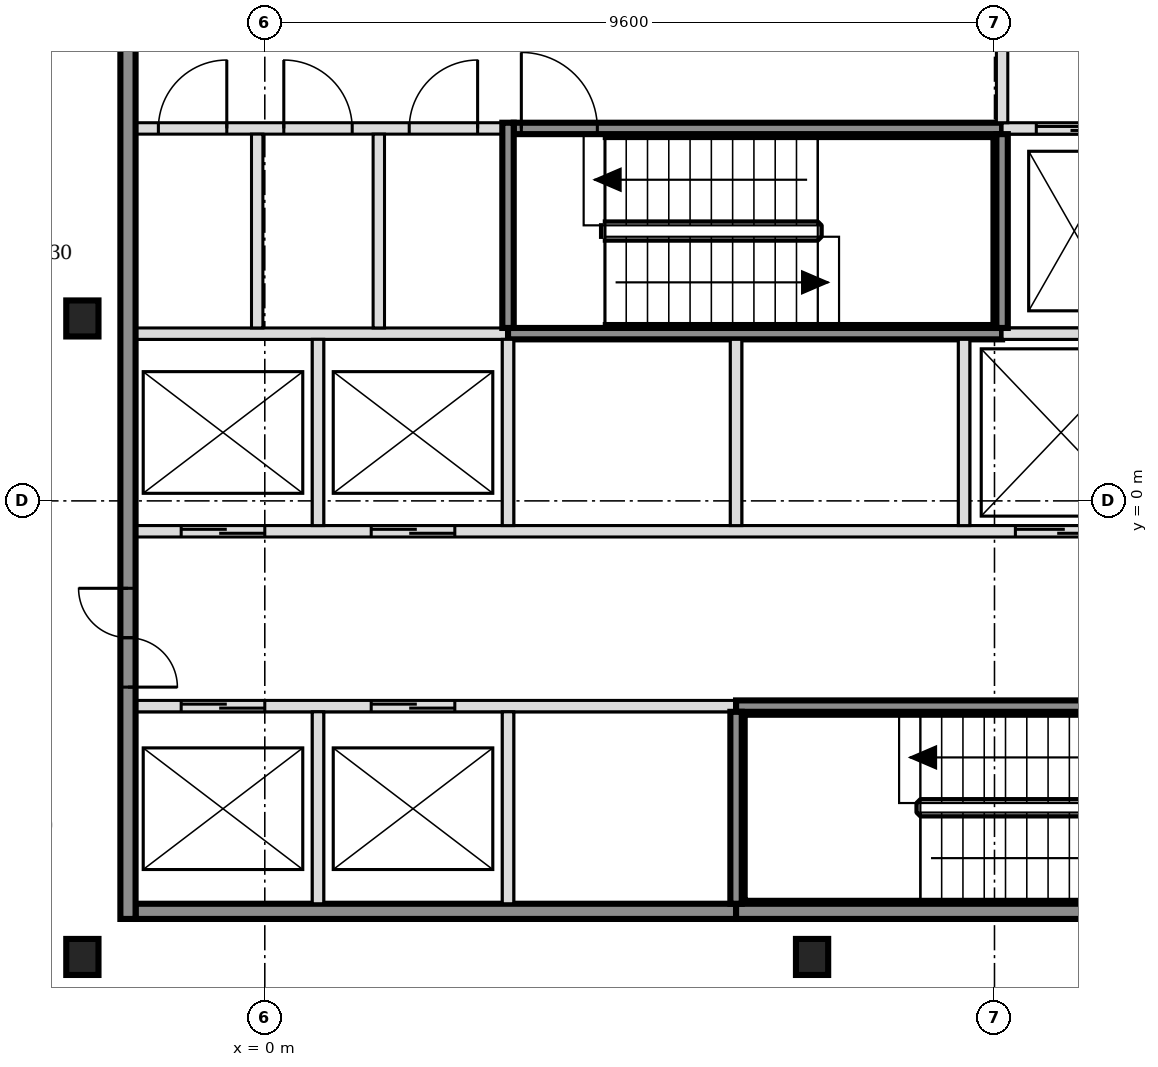
"""IFC4 building model, lengths in metres.
Left out: names, types, materials, properties, quantities, classifications, styles, units other than length and angle.
Written with IfcOpenShell. Run it as: python <this file> out.ifc"""

import sys

from ifc_helpers import new_model, si_unit, direction, frame, frame_2d, origin, origin_2d, place, context, subcontext, project, spatial, rectangle, i_section, extrude, element, fill, save


model = new_model("IFC4")
c1 = context("Model", 3, precision=1e-05, world=origin(), true_north=direction((0.0, 1.0)))
c2 = subcontext(c1, "Body", "Model", "MODEL_VIEW")
j1 = project(units=[si_unit("LENGTHUNIT", "METRE"), si_unit("PLANEANGLEUNIT", "RADIAN")], contexts=[c1])
p1 = place(None, origin())
s1 = spatial("IfcSite", under=j1, at=p1, CompositionType="ELEMENT")
p2 = place(p1, origin())
s2 = spatial("IfcBuilding", under=s1, at=p2, CompositionType="ELEMENT")
p3 = place(p2, frame((0.0, 0.0, 105.0)))
s3 = spatial("IfcBuildingStorey", under=s2, at=p3, CompositionType="ELEMENT", Elevation=105.0)
for number, where, z_axis, x_axis in (
    (1, (-2.4, -6.0, -0.15), (0.0, 0.0, 1.0), (1.0, 0.0, 0.0)),
    (2, (7.2, -6.0, -0.15), (0.0, 0.0, 1.0), (1.0, 0.0, 0.0)),
    (3, (-2.4, 2.4, -0.15), (0.0, 0.0, 1.0), (1.0, 0.0, 0.0)),
):
    element("IfcColumn", number, at=place(p3, frame(where, z_axis=z_axis, x_axis=x_axis)), inside=s3, PredefinedType="COLUMN", context=c2, shape_type="SweptSolid", body=[
        extrude(i_section(OverallWidth=0.424, OverallDepth=0.474, WebThickness=0.048, FlangeThickness=0.077, FilletRadius=0.015, at=origin_2d()), origin(), (0.0, 0.0, 1.0), 3.6),
    ])
p4 = place(p3, frame((-1.7, -5.4, 0.0), z_axis=(0.0, 0.0, 1.0), x_axis=(1.0, 0.0, 0.0)))
e4 = element("IfcWall", 4, at=p4, inside=s3, PredefinedType="SOLIDWALL", context=c2, shape_type="SweptSolid", body=[
    extrude(rectangle(XDim=7.9, YDim=0.2, at=frame_2d((3.95, 0.0))), origin(), (0.0, 0.0, 1.0), 3.45),
])
p5 = place(p3, frame((6.2, -5.4, 0.0), z_axis=(0.0, 0.0, 1.0), x_axis=(1.0, 0.0, 0.0)))
e5 = element("IfcWall", 5, at=p5, inside=s3, PredefinedType="SOLIDWALL", context=c2, shape_type="SweptSolid", body=[
    extrude(rectangle(XDim=6.5, YDim=0.2, at=frame_2d((3.25, 0.0))), origin(), (0.0, 0.0, 1.0), 3.45),
])
p6 = place(p3, frame((-1.7, -2.7, 0.0), z_axis=(0.0, 0.0, 1.0), x_axis=(1.0, 0.0, 0.0)))
e6 = element("IfcWall", 6, at=p6, inside=s3, PredefinedType="SOLIDWALL", context=c2, shape_type="SweptSolid", body=[
    extrude(rectangle(XDim=7.9, YDim=0.15, at=frame_2d((3.95, 0.0))), origin(), (0.0, 0.0, 1.0), 3.45),
])
p7 = place(p6, frame((0.6, 0.0, 0.0)))
e7 = element("IfcOpeningElement", 7, at=p7, cuts=e6, PredefinedType="OPENING", context=c2, shape_type="SweptSolid", body=[
    extrude(rectangle(XDim=1.1, YDim=2.1, at=frame_2d((0.55, 1.05))), frame((0.0, 0.085, 0.0), z_axis=(0.0, -1.0, 0.0), x_axis=(1.0, 0.0, 0.0)), (0.0, 0.0, 1.0), 0.17),
])
p8 = place(p6, frame((3.1, 0.0, 0.0)))
e8 = element("IfcOpeningElement", 8, at=p8, cuts=e6, PredefinedType="OPENING", context=c2, shape_type="SweptSolid", body=[
    extrude(rectangle(XDim=1.1, YDim=2.1, at=frame_2d((0.55, 1.05))), frame((0.0, 0.085, 0.0), z_axis=(0.0, -1.0, 0.0), x_axis=(1.0, 0.0, 0.0)), (0.0, 0.0, 1.0), 0.17),
])
p9 = place(p3, frame((6.2, -2.7, 0.0), z_axis=(0.0, 0.0, 1.0), x_axis=(1.0, 0.0, 0.0)))
e9 = element("IfcWall", 9, at=p9, inside=s3, PredefinedType="SOLIDWALL", context=c2, shape_type="SweptSolid", body=[
    extrude(rectangle(XDim=6.425, YDim=0.15, at=frame_2d((3.212, 0.0))), origin(), (0.0, 0.0, 1.0), 3.45),
])
p10 = place(p9, frame((5.3, 0.0, 0.0)))
e10 = element("IfcOpeningElement", 10, at=p10, cuts=e9, PredefinedType="OPENING", context=c2, shape_type="SweptSolid", body=[
    extrude(rectangle(XDim=1.0, YDim=2.1, at=frame_2d((0.5, 1.05))), frame((0.0, 0.085, 0.0), z_axis=(0.0, -1.0, 0.0), x_axis=(1.0, 0.0, 0.0)), (0.0, 0.0, 1.0), 0.17),
])
p11 = place(p3, frame((-1.7, -0.4, 0.0), z_axis=(0.0, 0.0, 1.0), x_axis=(1.0, 0.0, 0.0)))
e11 = element("IfcWall", 11, at=p11, inside=s3, PredefinedType="SOLIDWALL", context=c2, shape_type="SweptSolid", body=[
    extrude(rectangle(XDim=15.925, YDim=0.15, at=frame_2d((7.962, 0.0))), origin(), (0.0, 0.0, 1.0), 3.45),
])
p12 = place(p11, frame((0.6, 0.0, 0.0)))
e12 = element("IfcOpeningElement", 12, at=p12, cuts=e11, PredefinedType="OPENING", context=c2, shape_type="SweptSolid", body=[
    extrude(rectangle(XDim=1.1, YDim=2.1, at=frame_2d((0.55, 1.05))), frame((0.0, 0.085, 0.0), z_axis=(0.0, -1.0, 0.0), x_axis=(1.0, 0.0, 0.0)), (0.0, 0.0, 1.0), 0.17),
])
p13 = place(p11, frame((3.1, 0.0, 0.0)))
e13 = element("IfcOpeningElement", 13, at=p13, cuts=e11, PredefinedType="OPENING", context=c2, shape_type="SweptSolid", body=[
    extrude(rectangle(XDim=1.1, YDim=2.1, at=frame_2d((0.55, 1.05))), frame((0.0, 0.085, 0.0), z_axis=(0.0, -1.0, 0.0), x_axis=(1.0, 0.0, 0.0)), (0.0, 0.0, 1.0), 0.17),
])
p14 = place(p11, frame((11.575, 0.0, 0.0)))
e14 = element("IfcOpeningElement", 14, at=p14, cuts=e11, PredefinedType="OPENING", context=c2, shape_type="SweptSolid", body=[
    extrude(rectangle(XDim=1.2, YDim=2.1, at=frame_2d((0.6, 1.05))), frame((0.0, 0.085, 0.0), z_axis=(0.0, -1.0, 0.0), x_axis=(1.0, 0.0, 0.0)), (0.0, 0.0, 1.0), 0.17),
])
p15 = place(p11, frame((14.125, 0.0, 0.0)))
e15 = element("IfcOpeningElement", 15, at=p15, cuts=e11, PredefinedType="OPENING", context=c2, shape_type="SweptSolid", body=[
    extrude(rectangle(XDim=1.2, YDim=2.1, at=frame_2d((0.6, 1.05))), frame((0.0, 0.085, 0.0), z_axis=(0.0, -1.0, 0.0), x_axis=(1.0, 0.0, 0.0)), (0.0, 0.0, 1.0), 0.17),
])
p16 = place(p3, frame((-1.7, 2.2, 0.0), z_axis=(0.0, 0.0, 1.0), x_axis=(1.0, 0.0, 0.0)))
e16 = element("IfcWall", 16, at=p16, inside=s3, PredefinedType="SOLIDWALL", context=c2, shape_type="SweptSolid", body=[
    extrude(rectangle(XDim=4.9, YDim=0.15, at=frame_2d((2.45, 0.0))), origin(), (0.0, 0.0, 1.0), 3.45),
])
p17 = place(p3, frame((3.2, 2.2, 0.0), z_axis=(0.0, 0.0, 1.0), x_axis=(1.0, 0.0, 0.0)))
e17 = element("IfcWall", 17, at=p17, inside=s3, PredefinedType="SOLIDWALL", context=c2, shape_type="SweptSolid", body=[
    extrude(rectangle(XDim=6.5, YDim=0.15, at=frame_2d((3.25, 0.0))), origin(), (0.0, 0.0, 1.0), 3.45),
])
p18 = place(p3, frame((9.7, 2.2, 0.0), z_axis=(0.0, 0.0, 1.0), x_axis=(1.0, 0.0, 0.0)))
e18 = element("IfcWall", 18, at=p18, inside=s3, PredefinedType="SOLIDWALL", context=c2, shape_type="SweptSolid", body=[
    extrude(rectangle(XDim=4.525, YDim=0.15, at=frame_2d((2.263, 0.0))), origin(), (0.0, 0.0, 1.0), 3.45),
])
p19 = place(p3, frame((-1.7, 4.9, 0.0), z_axis=(0.0, 0.0, 1.0), x_axis=(1.0, 0.0, 0.0)))
e19 = element("IfcWall", 19, at=p19, inside=s3, PredefinedType="PARTITIONING", context=c2, shape_type="SweptSolid", body=[
    extrude(rectangle(XDim=4.825, YDim=0.15, at=frame_2d((2.413, 0.0))), origin(), (0.0, 0.0, 1.0), 3.45),
])
p20 = place(p19, frame((0.3, 0.0, 0.0)))
e20 = element("IfcOpeningElement", 20, at=p20, cuts=e19, PredefinedType="OPENING", context=c2, shape_type="SweptSolid", body=[
    extrude(rectangle(XDim=0.9, YDim=2.1, at=frame_2d((0.45, 1.05))), frame((0.0, 0.085, 0.0), z_axis=(0.0, -1.0, 0.0), x_axis=(1.0, 0.0, 0.0)), (0.0, 0.0, 1.0), 0.17),
])
p21 = place(p19, frame((1.95, 0.0, 0.0)))
e21 = element("IfcOpeningElement", 21, at=p21, cuts=e19, PredefinedType="OPENING", context=c2, shape_type="SweptSolid", body=[
    extrude(rectangle(XDim=0.9, YDim=2.1, at=frame_2d((0.45, 1.05))), frame((0.0, 0.085, 0.0), z_axis=(0.0, -1.0, 0.0), x_axis=(1.0, 0.0, 0.0)), (0.0, 0.0, 1.0), 0.17),
])
p22 = place(p19, frame((3.6, 0.0, 0.0)))
e22 = element("IfcOpeningElement", 22, at=p22, cuts=e19, PredefinedType="OPENING", context=c2, shape_type="SweptSolid", body=[
    extrude(rectangle(XDim=0.9, YDim=2.1, at=frame_2d((0.45, 1.05))), frame((0.0, 0.085, 0.0), z_axis=(0.0, -1.0, 0.0), x_axis=(1.0, 0.0, 0.0)), (0.0, 0.0, 1.0), 0.17),
])
p23 = place(p3, frame((3.275, 4.9, 0.0), z_axis=(0.0, 0.0, 1.0), x_axis=(1.0, 0.0, 0.0)))
e23 = element("IfcWall", 23, at=p23, inside=s3, PredefinedType="SOLIDWALL", context=c2, shape_type="SweptSolid", body=[
    extrude(rectangle(XDim=6.425, YDim=0.15, at=frame_2d((3.212, 0.0))), origin(), (0.0, 0.0, 1.0), 3.45),
])
p24 = place(p23, frame((0.1, 0.0, 0.0)))
e24 = element("IfcOpeningElement", 24, at=p24, cuts=e23, PredefinedType="OPENING", context=c2, shape_type="SweptSolid", body=[
    extrude(rectangle(XDim=1.0, YDim=2.1, at=frame_2d((0.5, 1.05))), frame((0.0, 0.085, 0.0), z_axis=(0.0, -1.0, 0.0), x_axis=(1.0, 0.0, 0.0)), (0.0, 0.0, 1.0), 0.17),
])
p25 = place(p3, frame((9.7, 4.9, 0.0), z_axis=(0.0, 0.0, 1.0), x_axis=(1.0, 0.0, 0.0)))
e25 = element("IfcWall", 25, at=p25, inside=s3, PredefinedType="SOLIDWALL", context=c2, shape_type="SweptSolid", body=[
    extrude(rectangle(XDim=6.4, YDim=0.15, at=frame_2d((3.2, 0.0))), origin(), (0.0, 0.0, 1.0), 3.45),
])
p26 = place(p25, frame((0.45, 0.0, 0.0)))
e26 = element("IfcOpeningElement", 26, at=p26, cuts=e25, PredefinedType="OPENING", context=c2, shape_type="SweptSolid", body=[
    extrude(rectangle(XDim=1.0, YDim=2.1, at=frame_2d((0.5, 1.05))), frame((0.0, 0.085, 0.0), z_axis=(0.0, -1.0, 0.0), x_axis=(1.0, 0.0, 0.0)), (0.0, 0.0, 1.0), 0.17),
])
p27 = place(p25, frame((2.35, 0.0, 0.0)))
e27 = element("IfcOpeningElement", 27, at=p27, cuts=e25, PredefinedType="OPENING", context=c2, shape_type="SweptSolid", body=[
    extrude(rectangle(XDim=1.0, YDim=2.1, at=frame_2d((0.5, 1.05))), frame((0.0, 0.085, 0.0), z_axis=(0.0, -1.0, 0.0), x_axis=(1.0, 0.0, 0.0)), (0.0, 0.0, 1.0), 0.17),
])
p28 = place(p25, frame((4.7, 0.0, 0.0)))
e28 = element("IfcOpeningElement", 28, at=p28, cuts=e25, PredefinedType="OPENING", context=c2, shape_type="SweptSolid", body=[
    extrude(rectangle(XDim=0.9, YDim=2.1, at=frame_2d((0.45, 1.05))), frame((0.0, 0.085, 0.0), z_axis=(0.0, -1.0, 0.0), x_axis=(1.0, 0.0, 0.0)), (0.0, 0.0, 1.0), 0.17),
])
p29 = place(p3, frame((-1.8, -5.5, 0.0), z_axis=(0.0, 0.0, 1.0), x_axis=(0.0, 1.0, 0.0)))
e29 = element("IfcWall", 29, at=p29, inside=s3, PredefinedType="SOLIDWALL", context=c2, shape_type="SweptSolid", body=[
    extrude(rectangle(XDim=15.8, YDim=0.2, at=frame_2d((7.9, 0.0))), origin(), (0.0, 0.0, 1.0), 3.45),
])
p30 = place(p29, frame((3.05, 0.0, 0.0)))
e30 = element("IfcOpeningElement", 30, at=p30, cuts=e29, PredefinedType="OPENING", context=c2, shape_type="SweptSolid", body=[
    extrude(rectangle(XDim=1.3, YDim=2.1, at=frame_2d((0.65, 1.05))), frame((0.0, 0.11, 0.0), z_axis=(0.0, -1.0, 0.0), x_axis=(1.0, 0.0, 0.0)), (0.0, 0.0, 1.0), 0.22),
])
p31 = place(p29, frame((11.45, 0.0, 0.0)))
e31 = element("IfcOpeningElement", 31, at=p31, cuts=e29, PredefinedType="OPENING", context=c2, shape_type="SweptSolid", body=[
    extrude(rectangle(XDim=1.3, YDim=2.1, at=frame_2d((0.65, 1.05))), frame((0.0, 0.11, 0.0), z_axis=(0.0, -1.0, 0.0), x_axis=(1.0, 0.0, 0.0)), (0.0, 0.0, 1.0), 0.22),
])
p32 = place(p3, frame((-0.1, 2.275, 0.0), z_axis=(0.0, 0.0, 1.0), x_axis=(0.0, 1.0, 0.0)))
e32 = element("IfcWall", 32, at=p32, inside=s3, PredefinedType="PARTITIONING", context=c2, shape_type="SweptSolid", body=[
    extrude(rectangle(XDim=2.55, YDim=0.15, at=frame_2d((1.275, 0.0))), origin(), (0.0, 0.0, 1.0), 3.45),
])
p33 = place(p3, frame((0.7, -5.3, 0.0), z_axis=(0.0, 0.0, 1.0), x_axis=(0.0, 1.0, 0.0)))
e33 = element("IfcWall", 33, at=p33, inside=s3, PredefinedType="SOLIDWALL", context=c2, shape_type="SweptSolid", body=[
    extrude(rectangle(XDim=2.525, YDim=0.15, at=frame_2d((1.263, 0.0))), origin(), (0.0, 0.0, 1.0), 3.45),
])
p34 = place(p3, frame((0.7, -0.325, 0.0), z_axis=(0.0, 0.0, 1.0), x_axis=(0.0, 1.0, 0.0)))
e34 = element("IfcWall", 34, at=p34, inside=s3, PredefinedType="SOLIDWALL", context=c2, shape_type="SweptSolid", body=[
    extrude(rectangle(XDim=2.45, YDim=0.15, at=frame_2d((1.225, 0.0))), origin(), (0.0, 0.0, 1.0), 3.45),
])
p35 = place(p3, frame((1.5, 2.275, 0.0), z_axis=(0.0, 0.0, 1.0), x_axis=(0.0, 1.0, 0.0)))
e35 = element("IfcWall", 35, at=p35, inside=s3, PredefinedType="PARTITIONING", context=c2, shape_type="SweptSolid", body=[
    extrude(rectangle(XDim=2.55, YDim=0.15, at=frame_2d((1.275, 0.0))), origin(), (0.0, 0.0, 1.0), 3.45),
])
p36 = place(p3, frame((3.2, -5.3, 0.0), z_axis=(0.0, 0.0, 1.0), x_axis=(0.0, 1.0, 0.0)))
e36 = element("IfcWall", 36, at=p36, inside=s3, PredefinedType="SOLIDWALL", context=c2, shape_type="SweptSolid", body=[
    extrude(rectangle(XDim=2.525, YDim=0.15, at=frame_2d((1.263, 0.0))), origin(), (0.0, 0.0, 1.0), 3.45),
])
p37 = place(p3, frame((3.2, -0.325, 0.0), z_axis=(0.0, 0.0, 1.0), x_axis=(0.0, 1.0, 0.0)))
e37 = element("IfcWall", 37, at=p37, inside=s3, PredefinedType="SOLIDWALL", context=c2, shape_type="SweptSolid", body=[
    extrude(rectangle(XDim=2.45, YDim=0.15, at=frame_2d((1.225, 0.0))), origin(), (0.0, 0.0, 1.0), 3.45),
])
p38 = place(p3, frame((3.2, 2.275, 0.0), z_axis=(0.0, 0.0, 1.0), x_axis=(0.0, 1.0, 0.0)))
e38 = element("IfcWall", 38, at=p38, inside=s3, PredefinedType="SOLIDWALL", context=c2, shape_type="SweptSolid", body=[
    extrude(rectangle(XDim=2.7, YDim=0.15, at=frame_2d((1.35, 0.0))), origin(), (0.0, 0.0, 1.0), 3.45),
])
p39 = place(p3, frame((6.2, -5.3, 0.0), z_axis=(0.0, 0.0, 1.0), x_axis=(0.0, 1.0, 0.0)))
e39 = element("IfcWall", 39, at=p39, inside=s3, PredefinedType="SOLIDWALL", context=c2, shape_type="SweptSolid", body=[
    extrude(rectangle(XDim=2.525, YDim=0.15, at=frame_2d((1.263, 0.0))), origin(), (0.0, 0.0, 1.0), 3.45),
])
for number, where, z_axis, x_axis in (
    (40, (6.2, -0.325, 0.0), (0.0, 0.0, 1.0), (0.0, 1.0, 0.0)),
    (41, (9.2, -0.325, 0.0), (0.0, 0.0, 1.0), (0.0, 1.0, 0.0)),
):
    element("IfcWall", number, at=place(p3, frame(where, z_axis=z_axis, x_axis=x_axis)), inside=s3, PredefinedType="SOLIDWALL", context=c2, shape_type="SweptSolid", body=[
        extrude(rectangle(XDim=2.45, YDim=0.15, at=frame_2d((1.225, 0.0))), origin(), (0.0, 0.0, 1.0), 3.45),
    ])
p40 = place(p3, frame((9.7, 2.275, 0.0), z_axis=(0.0, 0.0, 1.0), x_axis=(0.0, 1.0, 0.0)))
e42 = element("IfcWall", 42, at=p40, inside=s3, PredefinedType="SOLIDWALL", context=c2, shape_type="SweptSolid", body=[
    extrude(rectangle(XDim=2.55, YDim=0.15, at=frame_2d((1.275, 0.0))), origin(), (0.0, 0.0, 1.0), 3.45),
])
p41 = place(p3, frame((9.7, 4.975, 0.0), z_axis=(0.0, 0.0, 1.0), x_axis=(0.0, 1.0, 0.0)))
e43 = element("IfcWall", 43, at=p41, inside=s3, PredefinedType="SOLIDWALL", context=c2, shape_type="SweptSolid", body=[
    extrude(rectangle(XDim=2.45, YDim=0.15, at=frame_2d((1.225, 0.0))), origin(), (0.0, 0.0, 1.0), 3.45),
])
p42 = place(p7, origin())
e44 = element("IfcDoor", 44, at=p42, inside=s3, OperationType="DOUBLE_DOOR_SLIDING", PredefinedType="DOOR", context=c2, shape_type="SweptSolid", body=[
    extrude(rectangle(XDim=1.1, YDim=2.1, at=frame_2d((0.55, 1.05))), frame((0.0, 0.025, 0.0), z_axis=(0.0, -1.0, 0.0), x_axis=(1.0, 0.0, 0.0)), (0.0, 0.0, 1.0), 0.05),
])
fill(e7, e44)
p43 = place(p8, origin())
e45 = element("IfcDoor", 45, at=p43, inside=s3, OperationType="DOUBLE_DOOR_SLIDING", PredefinedType="DOOR", context=c2, shape_type="SweptSolid", body=[
    extrude(rectangle(XDim=1.1, YDim=2.1, at=frame_2d((0.55, 1.05))), frame((0.0, 0.025, 0.0), z_axis=(0.0, -1.0, 0.0), x_axis=(1.0, 0.0, 0.0)), (0.0, 0.0, 1.0), 0.05),
])
fill(e8, e45)
p44 = place(p12, origin())
e46 = element("IfcDoor", 46, at=p44, inside=s3, OperationType="DOUBLE_DOOR_SLIDING", PredefinedType="DOOR", context=c2, shape_type="SweptSolid", body=[
    extrude(rectangle(XDim=1.1, YDim=2.1, at=frame_2d((0.55, 1.05))), frame((0.0, 0.025, 0.0), z_axis=(0.0, -1.0, 0.0), x_axis=(1.0, 0.0, 0.0)), (0.0, 0.0, 1.0), 0.05),
])
fill(e12, e46)
p45 = place(p13, origin())
e47 = element("IfcDoor", 47, at=p45, inside=s3, OperationType="DOUBLE_DOOR_SLIDING", PredefinedType="DOOR", context=c2, shape_type="SweptSolid", body=[
    extrude(rectangle(XDim=1.1, YDim=2.1, at=frame_2d((0.55, 1.05))), frame((0.0, 0.025, 0.0), z_axis=(0.0, -1.0, 0.0), x_axis=(1.0, 0.0, 0.0)), (0.0, 0.0, 1.0), 0.05),
])
fill(e13, e47)
p46 = place(p14, origin())
e48 = element("IfcDoor", 48, at=p46, inside=s3, OperationType="DOUBLE_DOOR_SLIDING", PredefinedType="DOOR", context=c2, shape_type="SweptSolid", body=[
    extrude(rectangle(XDim=1.2, YDim=2.1, at=frame_2d((0.6, 1.05))), frame((0.0, 0.025, 0.0), z_axis=(0.0, -1.0, 0.0), x_axis=(1.0, 0.0, 0.0)), (0.0, 0.0, 1.0), 0.05),
])
fill(e14, e48)
p47 = place(p26, origin())
e49 = element("IfcDoor", 49, at=p47, inside=s3, OperationType="DOUBLE_DOOR_SLIDING", PredefinedType="DOOR", context=c2, shape_type="SweptSolid", body=[
    extrude(rectangle(XDim=1.0, YDim=2.1, at=frame_2d((0.5, 1.05))), frame((0.0, 0.025, 0.0), z_axis=(0.0, -1.0, 0.0), x_axis=(1.0, 0.0, 0.0)), (0.0, 0.0, 1.0), 0.05),
])
fill(e26, e49)
p48 = place(p24, origin())
e50 = element("IfcDoor", 50, at=p48, inside=s3, OperationType="SINGLE_SWING_LEFT", PredefinedType="DOOR", context=c2, shape_type="SweptSolid", body=[
    extrude(rectangle(XDim=1.0, YDim=2.1, at=frame_2d((0.5, 1.05))), frame((0.0, 0.025, 0.0), z_axis=(0.0, -1.0, 0.0), x_axis=(1.0, 0.0, 0.0)), (0.0, 0.0, 1.0), 0.05),
])
fill(e24, e50)
p49 = place(p30, origin())
e51 = element("IfcDoor", 51, at=p49, inside=s3, OperationType="DOUBLE_DOOR_SINGLE_SWING", PredefinedType="DOOR", context=c2, shape_type="SweptSolid", body=[
    extrude(rectangle(XDim=1.3, YDim=2.1, at=frame_2d((0.65, 1.05))), frame((0.0, 0.025, 0.0), z_axis=(0.0, -1.0, 0.0), x_axis=(1.0, 0.0, 0.0)), (0.0, 0.0, 1.0), 0.05),
])
fill(e30, e51)
p50 = place(p20, origin())
e52 = element("IfcDoor", 52, at=p50, inside=s3, OperationType="SINGLE_SWING_RIGHT", PredefinedType="DOOR", context=c2, shape_type="SweptSolid", body=[
    extrude(rectangle(XDim=0.9, YDim=2.1, at=frame_2d((0.45, 1.05))), frame((0.0, 0.025, 0.0), z_axis=(0.0, -1.0, 0.0), x_axis=(1.0, 0.0, 0.0)), (0.0, 0.0, 1.0), 0.05),
])
fill(e20, e52)
p51 = place(p21, origin())
e53 = element("IfcDoor", 53, at=p51, inside=s3, OperationType="SINGLE_SWING_LEFT", PredefinedType="DOOR", context=c2, shape_type="SweptSolid", body=[
    extrude(rectangle(XDim=0.9, YDim=2.1, at=frame_2d((0.45, 1.05))), frame((0.0, 0.025, 0.0), z_axis=(0.0, -1.0, 0.0), x_axis=(1.0, 0.0, 0.0)), (0.0, 0.0, 1.0), 0.05),
])
fill(e21, e53)
p52 = place(p22, origin())
e54 = element("IfcDoor", 54, at=p52, inside=s3, OperationType="SINGLE_SWING_RIGHT", PredefinedType="DOOR", context=c2, shape_type="SweptSolid", body=[
    extrude(rectangle(XDim=0.9, YDim=2.1, at=frame_2d((0.45, 1.05))), frame((0.0, 0.025, 0.0), z_axis=(0.0, -1.0, 0.0), x_axis=(1.0, 0.0, 0.0)), (0.0, 0.0, 1.0), 0.05),
])
fill(e22, e54)
save(model, sys.argv[1])
